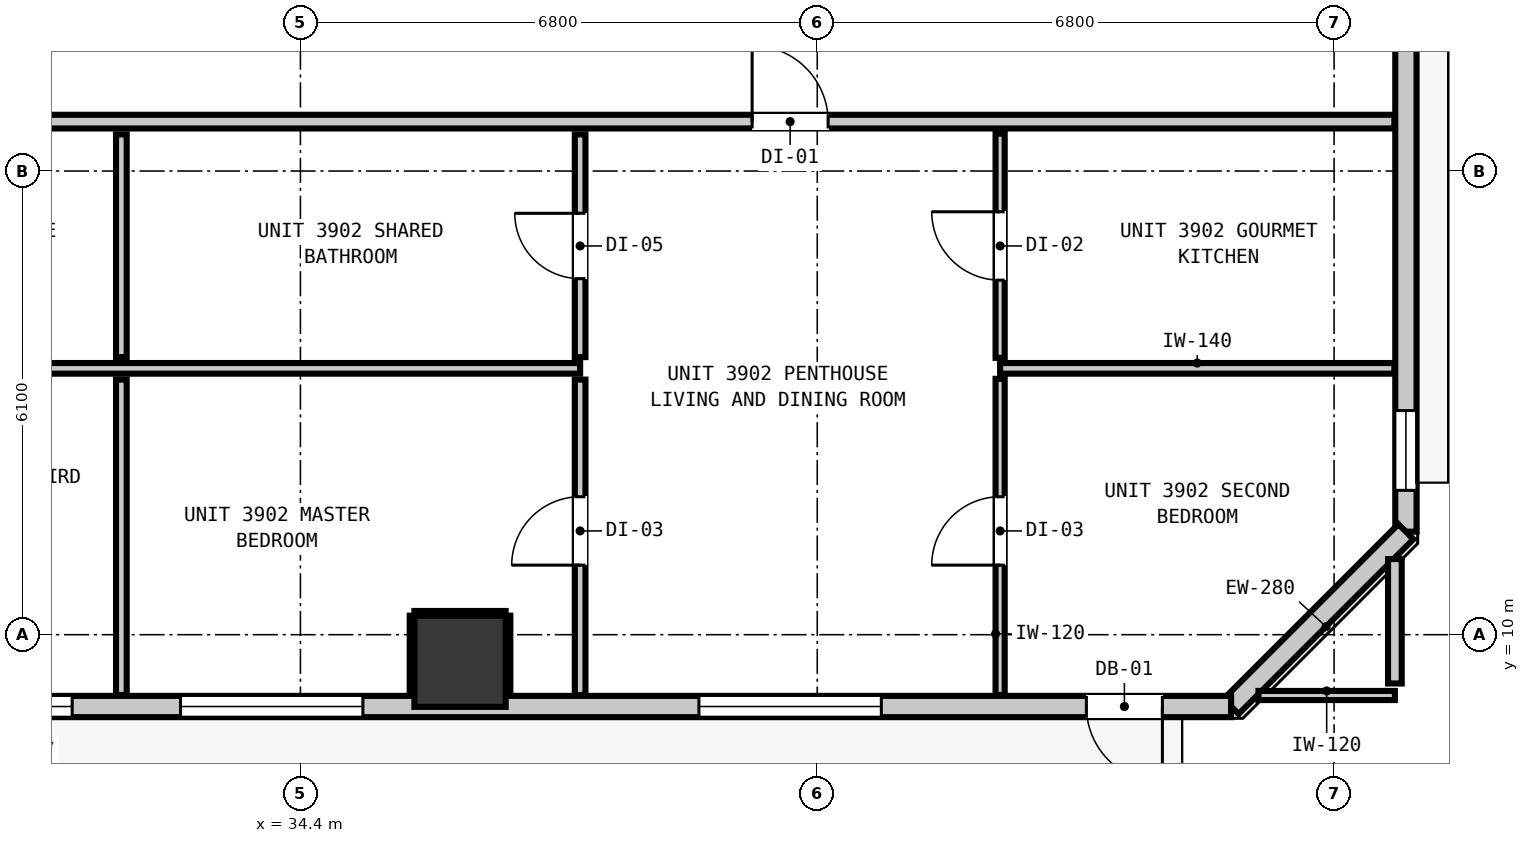
"""IFC4 building model, lengths in metres.
Left out: names, types, materials, properties, quantities, classifications, styles, units other than length and angle.
Written with IfcOpenShell. Run it as: python <this file> out.ifc"""

import sys

from ifc_helpers import new_model, si_unit, direction, frame, frame_2d, origin, origin_2d, place, context, subcontext, project, spatial, rectangle, extrude, element, fill, save


model = new_model("IFC4")
c1 = context("Model", 3, precision=1e-05, world=origin(), true_north=direction((0.0, 1.0)))
c2 = subcontext(c1, "Body", "Model", "MODEL_VIEW")
j1 = project(units=[si_unit("LENGTHUNIT", "METRE"), si_unit("PLANEANGLEUNIT", "RADIAN")], contexts=[c1])
p1 = place(None, origin())
s1 = spatial("IfcSite", under=j1, at=p1, CompositionType="ELEMENT")
p2 = place(p1, origin())
s2 = spatial("IfcBuilding", under=s1, at=p2, CompositionType="ELEMENT")
p3 = place(p2, frame((0.0, 0.0, 135.96)))
s3 = spatial("IfcBuildingStorey", under=s2, at=p3, CompositionType="ELEMENT", Elevation=135.96)
p4 = place(p3, frame((36.5, 9.65, 0.0), z_axis=(0.0, 0.0, 1.0), x_axis=(1.0, 0.0, 0.0)))
e1 = element("IfcColumn", 1, at=p4, inside=s3, PredefinedType="COLUMN", context=c2, shape_type="SweptSolid", body=[
    extrude(rectangle(XDim=1.2, YDim=1.2, at=origin_2d()), origin(), (0.0, 0.0, 1.0), 3.32),
])
p5 = place(p3, frame((48.945, 43.645, 0.0), z_axis=(0.0, 0.0, 1.0), x_axis=(0.0, -1.0, 0.0)))
e2 = element("IfcWall", 2, at=p5, inside=s3, PredefinedType="STANDARD", context=c2, shape_type="SweptSolid", body=[
    extrude(rectangle(XDim=32.29, YDim=0.28, at=frame_2d((16.145, 0.0))), origin(), (0.0, 0.0, 1.0), 3.08),
])
p6 = place(p5, frame((5.467, 0.0, 0.0)))
e3 = element("IfcOpeningElement", 3, at=p6, cuts=e2, PredefinedType="OPENING", context=c2, shape_type="SweptSolid", body=[
    extrude(rectangle(XDim=1.0, YDim=2.15, at=frame_2d((0.5, 1.075))), frame((0.0, 0.15, 0.0), z_axis=(0.0, -1.0, 0.0), x_axis=(1.0, 0.0, 0.0)), (0.0, 0.0, 1.0), 0.3),
])
p7 = place(p5, frame((30.696, 0.0, 0.85)))
e4 = element("IfcOpeningElement", 4, at=p7, cuts=e2, PredefinedType="OPENING", context=c2, shape_type="SweptSolid", body=[
    extrude(rectangle(XDim=1.05, YDim=1.65, at=frame_2d((0.525, 0.825))), frame((0.0, 0.15, 0.0), z_axis=(0.0, -1.0, 0.0), x_axis=(1.0, 0.0, 0.0)), (0.0, 0.0, 1.0), 0.3),
])
p8 = place(p5, frame((14.461, 0.0, 0.85)))
e5 = element("IfcOpeningElement", 5, at=p8, cuts=e2, PredefinedType="OPENING", context=c2, shape_type="SweptSolid", body=[
    extrude(rectangle(XDim=2.4, YDim=1.95, at=frame_2d((1.2, 0.975))), frame((0.0, 0.15, 0.0), z_axis=(0.0, -1.0, 0.0), x_axis=(1.0, 0.0, 0.0)), (0.0, 0.0, 1.0), 0.3),
])
p9 = place(p5, frame((7.106, 0.0, 0.85)))
e6 = element("IfcOpeningElement", 6, at=p9, cuts=e2, PredefinedType="OPENING", context=c2, shape_type="SweptSolid", body=[
    extrude(rectangle(XDim=1.05, YDim=1.65, at=frame_2d((0.525, 0.825))), frame((0.0, 0.15, 0.0), z_axis=(0.0, -1.0, 0.0), x_axis=(1.0, 0.0, 0.0)), (0.0, 0.0, 1.0), 0.3),
])
p10 = place(p3, frame((48.945, 11.355, 0.0), z_axis=(0.0, 0.0, 1.0), x_axis=(-0.707106781187, -0.707106781187, 0.0)))
e7 = element("IfcWall", 7, at=p10, inside=s3, PredefinedType="STANDARD", context=c2, shape_type="SweptSolid", body=[
    extrude(rectangle(XDim=3.253, YDim=0.28, at=frame_2d((1.626, 0.0))), origin(), (0.0, 0.0, 1.0), 3.08),
])
p11 = place(p3, frame((46.645, 9.055, 0.0), z_axis=(0.0, 0.0, 1.0), x_axis=(-1.0, 0.0, 0.0)))
e8 = element("IfcWall", 8, at=p11, inside=s3, PredefinedType="STANDARD", context=c2, shape_type="SweptSolid", body=[
    extrude(rectangle(XDim=35.09, YDim=0.28, at=frame_2d((17.545, 0.0))), origin(), (0.0, 0.0, 1.0), 3.08),
])
p12 = place(p11, frame((0.904, 0.0, 0.0)))
e9 = element("IfcOpeningElement", 9, at=p12, cuts=e8, PredefinedType="OPENING", context=c2, shape_type="SweptSolid", body=[
    extrude(rectangle(XDim=1.0, YDim=2.15, at=frame_2d((0.5, 1.075))), frame((0.0, 0.15, 0.0), z_axis=(0.0, -1.0, 0.0), x_axis=(1.0, 0.0, 0.0)), (0.0, 0.0, 1.0), 0.3),
])
p13 = place(p11, frame((27.805, 0.0, 0.85)))
e10 = element("IfcOpeningElement", 10, at=p13, cuts=e8, PredefinedType="OPENING", context=c2, shape_type="SweptSolid", body=[
    extrude(rectangle(XDim=2.4, YDim=1.95, at=frame_2d((1.2, 0.975))), frame((0.0, 0.15, 0.0), z_axis=(0.0, -1.0, 0.0), x_axis=(1.0, 0.0, 0.0)), (0.0, 0.0, 1.0), 0.3),
])
p14 = place(p11, frame((34.133, 0.0, 0.85)))
e11 = element("IfcOpeningElement", 11, at=p14, cuts=e8, PredefinedType="OPENING", context=c2, shape_type="SweptSolid", body=[
    extrude(rectangle(XDim=0.58, YDim=1.5, at=frame_2d((0.29, 0.75))), frame((0.0, 0.15, 0.0), z_axis=(0.0, -1.0, 0.0), x_axis=(1.0, 0.0, 0.0)), (0.0, 0.0, 1.0), 0.3),
])
p15 = place(p11, frame((20.445, 0.0, 0.85)))
e12 = element("IfcOpeningElement", 12, at=p15, cuts=e8, PredefinedType="OPENING", context=c2, shape_type="SweptSolid", body=[
    extrude(rectangle(XDim=2.4, YDim=1.95, at=frame_2d((1.2, 0.975))), frame((0.0, 0.15, 0.0), z_axis=(0.0, -1.0, 0.0), x_axis=(1.0, 0.0, 0.0)), (0.0, 0.0, 1.0), 0.3),
])
p16 = place(p11, frame((15.248, 0.0, 0.85)))
e13 = element("IfcOpeningElement", 13, at=p16, cuts=e8, PredefinedType="OPENING", context=c2, shape_type="SweptSolid", body=[
    extrude(rectangle(XDim=1.05, YDim=1.65, at=frame_2d((0.525, 0.825))), frame((0.0, 0.15, 0.0), z_axis=(0.0, -1.0, 0.0), x_axis=(1.0, 0.0, 0.0)), (0.0, 0.0, 1.0), 0.3),
])
p17 = place(p11, frame((4.602, 0.0, 0.85)))
e14 = element("IfcOpeningElement", 14, at=p17, cuts=e8, PredefinedType="OPENING", context=c2, shape_type="SweptSolid", body=[
    extrude(rectangle(XDim=2.4, YDim=1.95, at=frame_2d((1.2, 0.975))), frame((0.0, 0.15, 0.0), z_axis=(0.0, -1.0, 0.0), x_axis=(1.0, 0.0, 0.0)), (0.0, 0.0, 1.0), 0.3),
])
p18 = place(p11, frame((11.423, 0.0, 0.85)))
e15 = element("IfcOpeningElement", 15, at=p18, cuts=e8, PredefinedType="OPENING", context=c2, shape_type="SweptSolid", body=[
    extrude(rectangle(XDim=2.4, YDim=1.95, at=frame_2d((1.2, 0.975))), frame((0.0, 0.15, 0.0), z_axis=(0.0, -1.0, 0.0), x_axis=(1.0, 0.0, 0.0)), (0.0, 0.0, 1.0), 0.3),
])
p19 = place(p3, frame((9.407, 16.75, 0.0), z_axis=(0.0, 0.0, 1.0), x_axis=(1.0, 0.0, 0.0)))
e16 = element("IfcWall", 16, at=p19, inside=s3, PredefinedType="PARTITIONING", context=c2, shape_type="SweptSolid", body=[
    extrude(rectangle(XDim=39.386, YDim=0.18, at=frame_2d((19.693, 0.0))), origin(), (0.0, 0.0, 1.0), 3.08),
])
p20 = place(p19, frame((8.773, 0.0, 0.0)))
e17 = element("IfcOpeningElement", 17, at=p20, cuts=e16, PredefinedType="OPENING", context=c2, shape_type="SweptSolid", body=[
    extrude(rectangle(XDim=1.0, YDim=2.15, at=frame_2d((0.5, 1.075))), frame((0.0, 0.1, 0.0), z_axis=(0.0, -1.0, 0.0), x_axis=(1.0, 0.0, 0.0)), (0.0, 0.0, 1.0), 0.2),
])
p21 = place(p19, frame((30.936, 0.0, 0.0)))
e18 = element("IfcOpeningElement", 18, at=p21, cuts=e16, PredefinedType="OPENING", context=c2, shape_type="SweptSolid", body=[
    extrude(rectangle(XDim=1.0, YDim=2.15, at=frame_2d((0.5, 1.075))), frame((0.0, 0.1, 0.0), z_axis=(0.0, -1.0, 0.0), x_axis=(1.0, 0.0, 0.0)), (0.0, 0.0, 1.0), 0.2),
])
p22 = place(p3, frame((22.38, 13.504, 0.0), z_axis=(0.0, 0.0, 1.0), x_axis=(1.0, 0.0, 0.0)))
e19 = element("IfcWall", 19, at=p22, inside=s3, PredefinedType="PARTITIONING", context=c2, shape_type="SweptSolid", body=[
    extrude(rectangle(XDim=15.7, YDim=0.14, at=frame_2d((7.85, 0.0))), origin(), (0.0, 0.0, 1.0), 3.08),
])
p23 = place(p3, frame((43.606, 13.504, 0.0), z_axis=(0.0, 0.0, 1.0), x_axis=(1.0, 0.0, 0.0)))
e20 = element("IfcWall", 20, at=p23, inside=s3, PredefinedType="PARTITIONING", context=c2, shape_type="SweptSolid", body=[
    extrude(rectangle(XDim=5.187, YDim=0.14, at=frame_2d((2.594, 0.0))), origin(), (0.0, 0.0, 1.0), 3.08),
])
p24 = place(p3, frame((47.005, 9.2, 0.0), z_axis=(0.0, 0.0, 1.0), x_axis=(1.0, 0.0, 0.0)))
e21 = element("IfcWall", 21, at=p24, inside=s3, PredefinedType="PARTITIONING", context=c2, shape_type="SweptSolid", body=[
    extrude(rectangle(XDim=1.795, YDim=0.12, at=frame_2d((0.897, 0.0))), origin(), (0.0, 0.0, 1.0), 3.08),
])
p25 = place(p3, frame((48.8, 9.358, 0.0), z_axis=(0.0, 0.0, 1.0), x_axis=(0.0, 1.0, 0.0)))
e22 = element("IfcWall", 22, at=p25, inside=s3, PredefinedType="PARTITIONING", context=c2, shape_type="SweptSolid", body=[
    extrude(rectangle(XDim=1.637, YDim=0.18, at=frame_2d((0.819, 0.0))), origin(), (0.0, 0.0, 1.0), 3.08),
])
p26 = place(p3, frame((32.044, 9.207, 0.0), z_axis=(0.0, 0.0, 1.0), x_axis=(0.0, 1.0, 0.0)))
e23 = element("IfcWall", 23, at=p26, inside=s3, PredefinedType="PARTITIONING", context=c2, shape_type="SweptSolid", body=[
    extrude(rectangle(XDim=4.149, YDim=0.14, at=frame_2d((2.074, 0.0))), origin(), (0.0, 0.0, 1.0), 3.08),
])
p27 = place(p3, frame((32.044, 13.652, 0.0), z_axis=(0.0, 0.0, 1.0), x_axis=(0.0, 1.0, 0.0)))
e24 = element("IfcWall", 24, at=p27, inside=s3, PredefinedType="PARTITIONING", context=c2, shape_type="SweptSolid", body=[
    extrude(rectangle(XDim=2.93, YDim=0.14, at=frame_2d((1.465, 0.0))), origin(), (0.0, 0.0, 1.0), 3.08),
])
p28 = place(p3, frame((38.08, 9.207, 0.0), z_axis=(0.0, 0.0, 1.0), x_axis=(0.0, 1.0, 0.0)))
e25 = element("IfcWall", 25, at=p28, inside=s3, PredefinedType="PARTITIONING", context=c2, shape_type="SweptSolid", body=[
    extrude(rectangle(XDim=4.149, YDim=0.14, at=frame_2d((2.074, 0.0))), origin(), (0.0, 0.0, 1.0), 3.08),
])
p29 = place(p28, frame((1.708, 0.0, 0.0)))
e26 = element("IfcOpeningElement", 26, at=p29, cuts=e25, PredefinedType="OPENING", context=c2, shape_type="SweptSolid", body=[
    extrude(rectangle(XDim=0.9, YDim=2.1, at=frame_2d((0.45, 1.05))), frame((0.0, 0.08, 0.0), z_axis=(0.0, -1.0, 0.0), x_axis=(1.0, 0.0, 0.0)), (0.0, 0.0, 1.0), 0.16),
])
p30 = place(p3, frame((38.08, 13.652, 0.0), z_axis=(0.0, 0.0, 1.0), x_axis=(0.0, 1.0, 0.0)))
e27 = element("IfcWall", 27, at=p30, inside=s3, PredefinedType="PARTITIONING", context=c2, shape_type="SweptSolid", body=[
    extrude(rectangle(XDim=2.93, YDim=0.14, at=frame_2d((1.465, 0.0))), origin(), (0.0, 0.0, 1.0), 3.08),
])
p31 = place(p30, frame((1.032, 0.0, 0.0)))
e28 = element("IfcOpeningElement", 28, at=p31, cuts=e27, PredefinedType="OPENING", context=c2, shape_type="SweptSolid", body=[
    extrude(rectangle(XDim=0.86, YDim=2.02, at=frame_2d((0.43, 1.01))), frame((0.0, 0.08, 0.0), z_axis=(0.0, -1.0, 0.0), x_axis=(1.0, 0.0, 0.0)), (0.0, 0.0, 1.0), 0.16),
])
p32 = place(p3, frame((43.606, 9.207, 0.0), z_axis=(0.0, 0.0, 1.0), x_axis=(0.0, 1.0, 0.0)))
e29 = element("IfcWall", 29, at=p32, inside=s3, PredefinedType="PARTITIONING", context=c2, shape_type="SweptSolid", body=[
    extrude(rectangle(XDim=4.159, YDim=0.12, at=frame_2d((2.08, 0.0))), origin(), (0.0, 0.0, 1.0), 3.08),
])
p33 = place(p32, frame((1.708, 0.0, 0.0)))
e30 = element("IfcOpeningElement", 30, at=p33, cuts=e29, PredefinedType="OPENING", context=c2, shape_type="SweptSolid", body=[
    extrude(rectangle(XDim=0.9, YDim=2.1, at=frame_2d((0.45, 1.05))), frame((0.0, 0.07, 0.0), z_axis=(0.0, -1.0, 0.0), x_axis=(1.0, 0.0, 0.0)), (0.0, 0.0, 1.0), 0.14),
])
p34 = place(p3, frame((43.606, 13.642, 0.0), z_axis=(0.0, 0.0, 1.0), x_axis=(0.0, 1.0, 0.0)))
e31 = element("IfcWall", 31, at=p34, inside=s3, PredefinedType="PARTITIONING", context=c2, shape_type="SweptSolid", body=[
    extrude(rectangle(XDim=2.95, YDim=0.12, at=frame_2d((1.475, 0.0))), origin(), (0.0, 0.0, 1.0), 3.08),
])
p35 = place(p34, frame((1.022, 0.0, 0.0)))
e32 = element("IfcOpeningElement", 32, at=p35, cuts=e31, PredefinedType="OPENING", context=c2, shape_type="SweptSolid", body=[
    extrude(rectangle(XDim=0.9, YDim=2.1, at=frame_2d((0.45, 1.05))), frame((0.0, 0.07, 0.0), z_axis=(0.0, -1.0, 0.0), x_axis=(1.0, 0.0, 0.0)), (0.0, 0.0, 1.0), 0.14),
])
p36 = place(p3, frame((35.9, 10.282, 0.0), z_axis=(0.0, 0.0, 1.0), x_axis=(1.0, 0.0, 0.0)))
e33 = element("IfcWall", 33, at=p36, inside=s3, PredefinedType="PARTITIONING", context=c2, shape_type="SweptSolid", body=[
    extrude(rectangle(XDim=1.2, YDim=0.06, at=frame_2d((0.6, 0.0))), origin(), (0.0, 0.0, 1.0), 1.45),
])
for number, where, z_axis, x_axis in (
    (34, (35.868, 9.21, 0.0), (0.0, 0.0, 1.0), (0.0, 1.0, 0.0)),
    (35, (37.132, 9.21, 0.0), (0.0, 0.0, 1.0), (0.0, 1.0, 0.0)),
):
    element("IfcWall", number, at=place(p3, frame(where, z_axis=z_axis, x_axis=x_axis)), inside=s3, PredefinedType="PARTITIONING", context=c2, shape_type="SweptSolid", body=[
        extrude(rectangle(XDim=1.04, YDim=0.06, at=frame_2d((0.52, 0.0))), origin(), (0.0, 0.0, 1.0), 1.45),
    ])
p37 = place(p12, origin())
e36 = element("IfcDoor", 36, at=p37, inside=s3, OperationType="SINGLE_SWING_LEFT", PredefinedType="DOOR", context=c2, shape_type="SweptSolid", body=[
    extrude(rectangle(XDim=1.0, YDim=2.15, at=frame_2d((0.5, 1.075))), frame((0.0, 0.025, 0.0), z_axis=(0.0, -1.0, 0.0), x_axis=(1.0, 0.0, 0.0)), (0.0, 0.0, 1.0), 0.05),
])
fill(e9, e36)
p38 = place(p7, origin())
e37 = element("IfcWindow", 37, at=p38, inside=s3, PartitioningType="SINGLE_PANEL", PredefinedType="WINDOW", context=c2, shape_type="SweptSolid", body=[
    extrude(rectangle(XDim=1.05, YDim=1.65, at=frame_2d((0.525, 0.825))), frame((0.0, 0.03, 0.0), z_axis=(0.0, -1.0, 0.0), x_axis=(1.0, 0.0, 0.0)), (0.0, 0.0, 1.0), 0.06),
])
fill(e4, e37)
p39 = place(p16, origin())
e38 = element("IfcWindow", 38, at=p39, inside=s3, PartitioningType="SINGLE_PANEL", PredefinedType="WINDOW", context=c2, shape_type="SweptSolid", body=[
    extrude(rectangle(XDim=1.05, YDim=1.65, at=frame_2d((0.525, 0.825))), frame((0.0, 0.03, 0.0), z_axis=(0.0, -1.0, 0.0), x_axis=(1.0, 0.0, 0.0)), (0.0, 0.0, 1.0), 0.06),
])
fill(e13, e38)
p40 = place(p17, origin())
e39 = element("IfcWindow", 39, at=p40, inside=s3, PartitioningType="SINGLE_PANEL", PredefinedType="WINDOW", context=c2, shape_type="SweptSolid", body=[
    extrude(rectangle(XDim=2.4, YDim=1.95, at=frame_2d((1.2, 0.975))), frame((0.0, 0.03, 0.0), z_axis=(0.0, -1.0, 0.0), x_axis=(1.0, 0.0, 0.0)), (0.0, 0.0, 1.0), 0.06),
])
fill(e14, e39)
p41 = place(p18, origin())
e40 = element("IfcWindow", 40, at=p41, inside=s3, PartitioningType="SINGLE_PANEL", PredefinedType="WINDOW", context=c2, shape_type="SweptSolid", body=[
    extrude(rectangle(XDim=2.4, YDim=1.95, at=frame_2d((1.2, 0.975))), frame((0.0, 0.03, 0.0), z_axis=(0.0, -1.0, 0.0), x_axis=(1.0, 0.0, 0.0)), (0.0, 0.0, 1.0), 0.06),
])
fill(e15, e40)
p42 = place(p21, origin())
e41 = element("IfcDoor", 41, at=p42, inside=s3, OperationType="SINGLE_SWING_LEFT", PredefinedType="DOOR", context=c2, shape_type="SweptSolid", body=[
    extrude(rectangle(XDim=1.0, YDim=2.15, at=frame_2d((0.5, 1.075))), frame((0.0, 0.025, 0.0), z_axis=(0.0, -1.0, 0.0), x_axis=(1.0, 0.0, 0.0)), (0.0, 0.0, 1.0), 0.05),
])
fill(e18, e41)
p43 = place(p31, origin())
e42 = element("IfcDoor", 42, at=p43, inside=s3, OperationType="SINGLE_SWING_RIGHT", PredefinedType="DOOR", context=c2, shape_type="SweptSolid", body=[
    extrude(rectangle(XDim=0.86, YDim=2.02, at=frame_2d((0.43, 1.01))), frame((0.0, 0.025, 0.0), z_axis=(0.0, -1.0, 0.0), x_axis=(1.0, 0.0, 0.0)), (0.0, 0.0, 1.0), 0.05),
])
fill(e28, e42)
p44 = place(p29, origin())
e43 = element("IfcDoor", 43, at=p44, inside=s3, OperationType="SINGLE_SWING_LEFT", PredefinedType="DOOR", context=c2, shape_type="SweptSolid", body=[
    extrude(rectangle(XDim=0.9, YDim=2.1, at=frame_2d((0.45, 1.05))), frame((0.0, 0.025, 0.0), z_axis=(0.0, -1.0, 0.0), x_axis=(1.0, 0.0, 0.0)), (0.0, 0.0, 1.0), 0.05),
])
fill(e26, e43)
p45 = place(p35, origin())
e44 = element("IfcDoor", 44, at=p45, inside=s3, OperationType="SINGLE_SWING_RIGHT", PredefinedType="DOOR", context=c2, shape_type="SweptSolid", body=[
    extrude(rectangle(XDim=0.9, YDim=2.1, at=frame_2d((0.45, 1.05))), frame((0.0, 0.025, 0.0), z_axis=(0.0, -1.0, 0.0), x_axis=(1.0, 0.0, 0.0)), (0.0, 0.0, 1.0), 0.05),
])
fill(e32, e44)
p46 = place(p33, origin())
e45 = element("IfcDoor", 45, at=p46, inside=s3, OperationType="SINGLE_SWING_LEFT", PredefinedType="DOOR", context=c2, shape_type="SweptSolid", body=[
    extrude(rectangle(XDim=0.9, YDim=2.1, at=frame_2d((0.45, 1.05))), frame((0.0, 0.025, 0.0), z_axis=(0.0, -1.0, 0.0), x_axis=(1.0, 0.0, 0.0)), (0.0, 0.0, 1.0), 0.05),
])
fill(e30, e45)
save(model, sys.argv[1])
